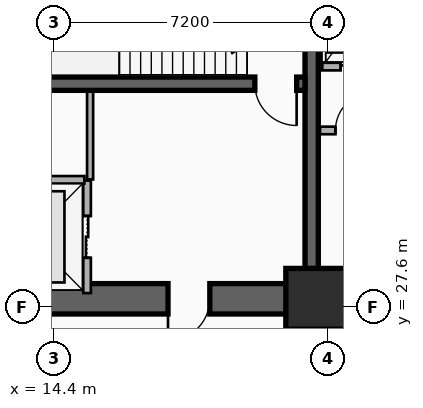
"""IFC4 building model, lengths in metres.
Left out: names, types, materials, properties, quantities, classifications, styles, units other than length and angle.
Written with IfcOpenShell. Run it as: python <this file> out.ifc"""

import sys

from ifc_helpers import new_model, si_unit, direction, frame, frame_2d, origin, origin_2d, place, context, subcontext, project, spatial, rectangle, extrude, element, fill, save


model = new_model("IFC4")
c1 = context("Model", 3, precision=1e-05, world=origin(), true_north=direction((0.0, 1.0)))
c2 = subcontext(c1, "Body", "Model", "MODEL_VIEW")
j1 = project(units=[si_unit("LENGTHUNIT", "METRE"), si_unit("PLANEANGLEUNIT", "RADIAN")], contexts=[c1])
p1 = place(None, origin())
s1 = spatial("IfcSite", under=j1, at=p1, CompositionType="ELEMENT")
p2 = place(p1, origin())
s2 = spatial("IfcBuilding", under=s1, at=p2, CompositionType="ELEMENT")
p3 = place(p2, frame((0.0, 0.0, 24.2)))
s3 = spatial("IfcBuildingStorey", under=s2, at=p3, CompositionType="ELEMENT", Elevation=24.2)
p4 = place(p3, frame((21.18, 27.82, 0.0), z_axis=(0.0, 0.0, 1.0), x_axis=(-1.0, 0.0, 0.0)))
e1 = element("IfcWall", 1, at=p4, inside=s3, PredefinedType="SHEAR", context=c2, shape_type="SweptSolid", body=[
    extrude(rectangle(XDim=9.03, YDim=0.8, at=frame_2d((4.515, 0.0))), origin(), (0.0, 0.0, 1.0), 4.8),
])
p5 = place(p4, frame((2.68, 0.0, 0.0)))
e2 = element("IfcOpeningElement", 2, at=p5, cuts=e1, PredefinedType="OPENING", context=c2, shape_type="SweptSolid", body=[
    extrude(rectangle(XDim=1.1, YDim=2.15, at=frame_2d((0.55, 1.075))), frame((0.0, 0.41, 0.0), z_axis=(0.0, -1.0, 0.0), x_axis=(1.0, 0.0, 0.0)), (0.0, 0.0, 1.0), 0.82),
])
p6 = place(p3, frame((33.15, 27.82, 0.0), z_axis=(0.0, 0.0, 1.0), x_axis=(-1.0, 0.0, 0.0)))
e3 = element("IfcWall", 3, at=p6, inside=s3, PredefinedType="SHEAR", context=c2, shape_type="SweptSolid", body=[
    extrude(rectangle(XDim=11.97, YDim=0.8, at=frame_2d((5.985, 0.0))), origin(), (0.0, 0.0, 1.0), 4.8),
])
p7 = place(p6, frame((6.1, 0.0, 0.0)))
e4 = element("IfcOpeningElement", 4, at=p7, cuts=e3, PredefinedType="OPENING", context=c2, shape_type="SweptSolid", body=[
    extrude(rectangle(XDim=1.6, YDim=2.2, at=frame_2d((0.8, 1.1))), frame((0.0, 0.41, 0.0), z_axis=(0.0, -1.0, 0.0), x_axis=(1.0, 0.0, 0.0)), (0.0, 0.0, 1.0), 0.82),
])
p8 = place(p3, frame((21.18, 28.22, 0.0), z_axis=(0.0, 0.0, 1.0), x_axis=(0.0, 1.0, 0.0)))
e5 = element("IfcWall", 5, at=p8, inside=s3, PredefinedType="SHEAR", context=c2, shape_type="SweptSolid", body=[
    extrude(rectangle(XDim=8.43, YDim=0.35, at=frame_2d((4.215, 0.0))), origin(), (0.0, 0.0, 1.0), 4.8),
])
p9 = place(p3, frame((21.005, 33.48, 0.0), z_axis=(0.0, 0.0, 1.0), x_axis=(-1.0, 0.0, 0.0)))
e6 = element("IfcWall", 6, at=p9, inside=s3, PredefinedType="SHEAR", context=c2, shape_type="SweptSolid", body=[
    extrude(rectangle(XDim=8.455, YDim=0.35, at=frame_2d((4.228, 0.0))), origin(), (0.0, 0.0, 1.0), 4.8),
])
p10 = place(p9, frame((0.22, 0.0, 0.0)))
e7 = element("IfcOpeningElement", 7, at=p10, cuts=e6, PredefinedType="OPENING", context=c2, shape_type="SweptSolid", body=[
    extrude(rectangle(XDim=1.1, YDim=2.15, at=frame_2d((0.55, 1.075))), frame((0.0, 0.185, 0.0), z_axis=(0.0, -1.0, 0.0), x_axis=(1.0, 0.0, 0.0)), (0.0, 0.0, 1.0), 0.37),
])
p11 = place(p3, frame((21.3, 27.82, 0.0), z_axis=(0.0, 0.0, 1.0), x_axis=(1.0, 0.0, 0.0)))
e8 = element("IfcColumn", 8, at=p11, inside=s3, PredefinedType="COLUMN", context=c2, shape_type="SweptSolid", body=[
    extrude(rectangle(XDim=1.6, YDim=1.6, at=origin_2d()), origin(), (0.0, 0.0, 1.0), 4.8),
])
p12 = place(p3, frame((15.27, 27.97, 0.0), z_axis=(0.0, 0.0, 1.0), x_axis=(0.0, 1.0, 0.0)))
e9 = element("IfcWall", 9, at=p12, inside=s3, PredefinedType="PARTITIONING", context=c2, shape_type="SweptSolid", body=[
    extrude(rectangle(XDim=2.96, YDim=0.2, at=frame_2d((1.48, 0.0))), origin(), (0.0, 0.0, 1.0), 3.452),
])
p13 = place(p12, frame((0.93, 0.0, 0.0)))
e10 = element("IfcOpeningElement", 10, at=p13, cuts=e9, PredefinedType="OPENING", context=c2, shape_type="SweptSolid", body=[
    extrude(rectangle(XDim=1.1, YDim=2.15, at=frame_2d((0.55, 1.075))), frame((0.0, 0.11, 0.0), z_axis=(0.0, -1.0, 0.0), x_axis=(1.0, 0.0, 0.0)), (0.0, 0.0, 1.0), 0.22),
])
p14 = place(p3, frame((12.45, 30.95, 0.0), z_axis=(0.0, 0.0, 1.0), x_axis=(1.0, 0.0, 0.0)))
e11 = element("IfcWall", 11, at=p14, inside=s3, PredefinedType="PARTITIONING", context=c2, shape_type="SweptSolid", body=[
    extrude(rectangle(XDim=2.75, YDim=0.2, at=frame_2d((1.375, 0.0))), origin(), (0.0, 0.0, 1.0), 3.452),
])
p15 = place(p3, frame((21.46, 33.93, 0.0), z_axis=(0.0, 0.0, 1.0), x_axis=(1.0, 0.0, 0.0)))
e12 = element("IfcWall", 12, at=p15, inside=s3, PredefinedType="PARTITIONING", context=c2, shape_type="SweptSolid", body=[
    extrude(rectangle(XDim=2.065, YDim=0.2, at=frame_2d((1.032, 0.0))), origin(), (0.0, 0.0, 1.0), 3.452),
])
p16 = place(p15, frame((0.482, 0.0, 0.0)))
e13 = element("IfcOpeningElement", 13, at=p16, cuts=e12, PredefinedType="OPENING", context=c2, shape_type="SweptSolid", body=[
    extrude(rectangle(XDim=1.1, YDim=2.15, at=frame_2d((0.55, 1.075))), frame((0.0, 0.11, 0.0), z_axis=(0.0, -1.0, 0.0), x_axis=(1.0, 0.0, 0.0)), (0.0, 0.0, 1.0), 0.22),
])
p17 = place(p3, frame((21.4, 32.25, 0.0), z_axis=(0.0, 0.0, 1.0), x_axis=(1.0, 0.0, 0.0)))
e14 = element("IfcWall", 14, at=p17, inside=s3, PredefinedType="PARTITIONING", context=c2, shape_type="SweptSolid", body=[
    extrude(rectangle(XDim=1.81, YDim=0.2, at=frame_2d((0.905, 0.0))), origin(), (0.0, 0.0, 1.0), 3.452),
])
p18 = place(p17, frame((0.405, 0.0, 0.0)))
e15 = element("IfcOpeningElement", 15, at=p18, cuts=e14, PredefinedType="OPENING", context=c2, shape_type="SweptSolid", body=[
    extrude(rectangle(XDim=1.0, YDim=2.15, at=frame_2d((0.5, 1.075))), frame((0.0, 0.11, 0.0), z_axis=(0.0, -1.0, 0.0), x_axis=(1.0, 0.0, 0.0)), (0.0, 0.0, 1.0), 0.22),
])
p19 = place(p3, frame((15.35, 30.96, 0.0), z_axis=(0.0, 0.0, 1.0), x_axis=(0.0, 1.0, 0.0)))
e16 = element("IfcWall", 16, at=p19, inside=s3, PredefinedType="PARTITIONING", context=c2, shape_type="SweptSolid", body=[
    extrude(rectangle(XDim=2.31, YDim=0.16, at=frame_2d((1.155, 0.0))), origin(), (0.0, 0.0, 1.0), 4.48),
])
p20 = place(p13, origin())
e17 = element("IfcDoor", 17, at=p20, inside=s3, OperationType="DOUBLE_DOOR_SLIDING", PredefinedType="DOOR", context=c2, shape_type="SweptSolid", body=[
    extrude(rectangle(XDim=1.1, YDim=2.15, at=frame_2d((0.55, 1.075))), frame((0.0, 0.025, 0.0), z_axis=(0.0, -1.0, 0.0), x_axis=(1.0, 0.0, 0.0)), (0.0, 0.0, 1.0), 0.05),
])
fill(e10, e17)
p21 = place(p16, origin())
e18 = element("IfcDoor", 18, at=p21, inside=s3, OperationType="DOUBLE_DOOR_SLIDING", PredefinedType="DOOR", context=c2, shape_type="SweptSolid", body=[
    extrude(rectangle(XDim=1.1, YDim=2.15, at=frame_2d((0.55, 1.075))), frame((0.0, 0.025, 0.0), z_axis=(0.0, -1.0, 0.0), x_axis=(1.0, 0.0, 0.0)), (0.0, 0.0, 1.0), 0.05),
])
fill(e13, e18)
p22 = place(p10, origin())
e19 = element("IfcDoor", 19, at=p22, inside=s3, OperationType="SINGLE_SWING_LEFT", PredefinedType="DOOR", context=c2, shape_type="SweptSolid", body=[
    extrude(rectangle(XDim=1.1, YDim=2.15, at=frame_2d((0.55, 1.075))), frame((0.0, 0.025, 0.0), z_axis=(0.0, -1.0, 0.0), x_axis=(1.0, 0.0, 0.0)), (0.0, 0.0, 1.0), 0.05),
])
fill(e7, e19)
p23 = place(p5, origin())
e20 = element("IfcDoor", 20, at=p23, inside=s3, OperationType="SINGLE_SWING_RIGHT", PredefinedType="DOOR", context=c2, shape_type="SweptSolid", body=[
    extrude(rectangle(XDim=1.1, YDim=2.15, at=frame_2d((0.55, 1.075))), frame((0.0, 0.025, 0.0), z_axis=(0.0, -1.0, 0.0), x_axis=(1.0, 0.0, 0.0)), (0.0, 0.0, 1.0), 0.05),
])
fill(e2, e20)
p24 = place(p18, origin())
e21 = element("IfcDoor", 21, at=p24, inside=s3, OperationType="SINGLE_SWING_RIGHT", PredefinedType="DOOR", context=c2, shape_type="SweptSolid", body=[
    extrude(rectangle(XDim=1.0, YDim=2.15, at=frame_2d((0.5, 1.075))), frame((0.0, 0.025, 0.0), z_axis=(0.0, -1.0, 0.0), x_axis=(1.0, 0.0, 0.0)), (0.0, 0.0, 1.0), 0.05),
])
fill(e15, e21)
save(model, sys.argv[1])
